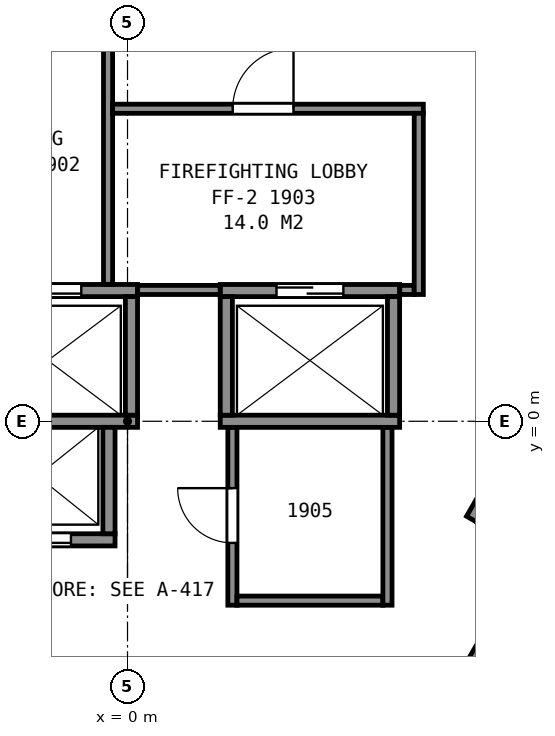
"""IFC4 building model, lengths in metres.
Left out: names, types, materials, properties, quantities, classifications, styles, units other than length and angle.
Written with IfcOpenShell. Run it as: python <this file> out.ifc"""

import sys

from ifc_helpers import new_model, si_unit, direction, frame, frame_2d, origin, place, context, subcontext, project, spatial, rectangle, extrude, element, fill, save


model = new_model("IFC4")
c1 = context("Model", 3, precision=1e-05, world=origin(), true_north=direction((0.0, 1.0)))
c2 = subcontext(c1, "Body", "Model", "MODEL_VIEW")
j1 = project(units=[si_unit("LENGTHUNIT", "METRE"), si_unit("PLANEANGLEUNIT", "RADIAN")], contexts=[c1])
p1 = place(None, origin())
s1 = spatial("IfcSite", under=j1, at=p1, CompositionType="ELEMENT")
p2 = place(p1, origin())
s2 = spatial("IfcBuilding", under=s1, at=p2, CompositionType="ELEMENT")
p3 = place(p2, frame((0.0, 0.0, 83.6)))
s3 = spatial("IfcBuildingStorey", under=s2, at=p3, CompositionType="ELEMENT", Elevation=83.6)
p4 = place(p3, frame((-2.755, -1.95, 0.0), z_axis=(0.0, 0.0, 1.0), x_axis=(1.0, 0.0, 0.0)))
e1 = element("IfcWall", 1, at=p4, inside=s3, PredefinedType="PARTITIONING", context=c2, shape_type="SweptSolid", body=[
    extrude(rectangle(XDim=2.55, YDim=0.2, at=frame_2d((1.275, 0.0))), origin(), (0.0, 0.0, 1.0), 3.6),
])
p5 = place(p4, frame((0.725, 0.0, 0.0)))
e2 = element("IfcOpeningElement", 2, at=p5, cuts=e1, PredefinedType="OPENING", context=c2, shape_type="SweptSolid", body=[
    extrude(rectangle(XDim=1.1, YDim=2.1, at=frame_2d((0.55, 1.05))), frame((0.0, 0.11, 0.0), z_axis=(0.0, -1.0, 0.0), x_axis=(1.0, 0.0, 0.0)), (0.0, 0.0, 1.0), 0.22),
])
p6 = place(p3, frame((-2.785, 0.0, 0.0), z_axis=(0.0, 0.0, 1.0), x_axis=(1.0, 0.0, 0.0)))
e3 = element("IfcWall", 3, at=p6, inside=s3, PredefinedType="PARTITIONING", context=c2, shape_type="SweptSolid", body=[
    extrude(rectangle(XDim=2.95, YDim=0.2, at=frame_2d((1.475, 0.0))), origin(), (0.0, 0.0, 1.0), 3.6),
])
p7 = place(p3, frame((1.525, 0.0, 0.0), z_axis=(0.0, 0.0, 1.0), x_axis=(1.0, 0.0, 0.0)))
e4 = element("IfcWall", 4, at=p7, inside=s3, PredefinedType="PARTITIONING", context=c2, shape_type="SweptSolid", body=[
    extrude(rectangle(XDim=2.95, YDim=0.2, at=frame_2d((1.475, 0.0))), origin(), (0.0, 0.0, 1.0), 3.6),
])
p8 = place(p3, frame((-2.785, 2.15, 0.0), z_axis=(0.0, 0.0, 1.0), x_axis=(1.0, 0.0, 0.0)))
e5 = element("IfcWall", 5, at=p8, inside=s3, PredefinedType="PARTITIONING", context=c2, shape_type="SweptSolid", body=[
    extrude(rectangle(XDim=2.95, YDim=0.2, at=frame_2d((1.475, 0.0))), origin(), (0.0, 0.0, 1.0), 3.6),
])
p9 = place(p8, frame((0.925, 0.0, 0.0)))
e6 = element("IfcOpeningElement", 6, at=p9, cuts=e5, PredefinedType="OPENING", context=c2, shape_type="SweptSolid", body=[
    extrude(rectangle(XDim=1.1, YDim=2.1, at=frame_2d((0.55, 1.05))), frame((0.0, 0.11, 0.0), z_axis=(0.0, -1.0, 0.0), x_axis=(1.0, 0.0, 0.0)), (0.0, 0.0, 1.0), 0.22),
])
p10 = place(p3, frame((1.525, 2.15, 0.0), z_axis=(0.0, 0.0, 1.0), x_axis=(1.0, 0.0, 0.0)))
e7 = element("IfcWall", 7, at=p10, inside=s3, PredefinedType="PARTITIONING", context=c2, shape_type="SweptSolid", body=[
    extrude(rectangle(XDim=2.95, YDim=0.2, at=frame_2d((1.475, 0.0))), origin(), (0.0, 0.0, 1.0), 3.6),
])
p11 = place(p10, frame((0.925, 0.0, 0.0)))
e8 = element("IfcOpeningElement", 8, at=p11, cuts=e7, PredefinedType="OPENING", context=c2, shape_type="SweptSolid", body=[
    extrude(rectangle(XDim=1.1, YDim=2.1, at=frame_2d((0.55, 1.05))), frame((0.0, 0.11, 0.0), z_axis=(0.0, -1.0, 0.0), x_axis=(1.0, 0.0, 0.0)), (0.0, 0.0, 1.0), 0.22),
])
p12 = place(p3, frame((5.527, -4.247, 0.0), z_axis=(0.0, 0.0, 1.0), x_axis=(0.499938297808, 0.866061024631, 0.0)))
e9 = element("IfcWall", 9, at=p12, inside=s3, PredefinedType="PARTITIONING", context=c2, shape_type="SweptSolid", body=[
    extrude(rectangle(XDim=2.35, YDim=0.2, at=frame_2d((1.175, 0.0))), origin(), (0.0, 0.0, 1.0), 3.6),
])
p13 = place(p12, frame((0.725, 0.0, 0.0)))
e10 = element("IfcOpeningElement", 10, at=p13, cuts=e9, PredefinedType="OPENING", context=c2, shape_type="SweptSolid", body=[
    extrude(rectangle(XDim=1.1, YDim=2.1, at=frame_2d((0.55, 1.05))), frame((0.0, 0.11, 0.0), z_axis=(0.0, -1.0, 0.0), x_axis=(1.0, 0.0, 0.0)), (0.0, 0.0, 1.0), 0.22),
])
p14 = place(p3, frame((5.663, -1.612, 0.0), z_axis=(0.0, 0.0, 1.0), x_axis=(0.49998122708, 0.866036242063, 0.0)))
e11 = element("IfcWall", 11, at=p14, inside=s3, PredefinedType="PARTITIONING", context=c2, shape_type="SweptSolid", body=[
    extrude(rectangle(XDim=4.9, YDim=0.2, at=frame_2d((2.45, 0.0))), origin(), (0.0, 0.0, 1.0), 3.6),
])
for number, where, z_axis, x_axis in (
    (12, (4.375, 0.1, 0.0), (0.0, 0.0, 1.0), (0.0, 1.0, 0.0)),
    (13, (1.625, 0.1, 0.0), (0.0, 0.0, 1.0), (0.0, 1.0, 0.0)),
    (14, (0.065, 0.1, 0.0), (0.0, 0.0, 1.0), (0.0, 1.0, 0.0)),
):
    element("IfcWall", number, at=place(p3, frame(where, z_axis=z_axis, x_axis=x_axis)), inside=s3, PredefinedType="PARTITIONING", context=c2, shape_type="SweptSolid", body=[
        extrude(rectangle(XDim=1.95, YDim=0.2, at=frame_2d((0.975, 0.0))), origin(), (0.0, 0.0, 1.0), 3.6),
    ])
p15 = place(p3, frame((-0.305, -1.85, 0.0), z_axis=(0.0, 0.0, 1.0), x_axis=(0.0, 1.0, 0.0)))
e15 = element("IfcWall", 15, at=p15, inside=s3, PredefinedType="PARTITIONING", context=c2, shape_type="SweptSolid", body=[
    extrude(rectangle(XDim=1.75, YDim=0.2, at=frame_2d((0.875, 0.0))), origin(), (0.0, 0.0, 1.0), 3.6),
])
p16 = place(p3, frame((-0.32, 2.252, 0.0), z_axis=(0.0, 0.0, 1.0), x_axis=(0.0, 1.0, 0.0)))
e16 = element("IfcWall", 16, at=p16, inside=s3, PredefinedType="PARTITIONING", context=c2, shape_type="SweptSolid", body=[
    extrude(rectangle(XDim=4.063, YDim=0.15, at=frame_2d((2.031, 0.0))), origin(), (0.0, 0.0, 1.0), 3.35),
])
p17 = place(p3, frame((-0.245, 5.14, 0.0), z_axis=(0.0, 0.0, 1.0), x_axis=(1.0, 0.0, 0.0)))
e17 = element("IfcWall", 17, at=p17, inside=s3, PredefinedType="PARTITIONING", context=c2, shape_type="SweptSolid", body=[
    extrude(rectangle(XDim=5.11, YDim=0.15, at=frame_2d((2.555, 0.0))), origin(), (0.0, 0.0, 1.0), 3.35),
])
p18 = place(p17, frame((1.975, 0.0, 0.0)))
e18 = element("IfcOpeningElement", 18, at=p18, cuts=e17, PredefinedType="OPENING", context=c2, shape_type="SweptSolid", body=[
    extrude(rectangle(XDim=1.0, YDim=2.1, at=frame_2d((0.5, 1.05))), frame((0.0, 0.085, 0.0), z_axis=(0.0, -1.0, 0.0), x_axis=(1.0, 0.0, 0.0)), (0.0, 0.0, 1.0), 0.17),
])
p19 = place(p3, frame((0.167, 2.16, 0.0), z_axis=(0.0, 0.0, 1.0), x_axis=(1.0, 0.0, 0.0)))
e19 = element("IfcWall", 19, at=p19, inside=s3, PredefinedType="PARTITIONING", context=c2, shape_type="SweptSolid", body=[
    extrude(rectangle(XDim=1.356, YDim=0.15, at=frame_2d((0.678, 0.0))), origin(), (0.0, 0.0, 1.0), 3.35),
])
p20 = place(p3, frame((1.725, -0.102, 0.0), z_axis=(0.0, 0.0, 1.0), x_axis=(0.0, -1.0, 0.0)))
e20 = element("IfcWall", 20, at=p20, inside=s3, PredefinedType="PARTITIONING", context=c2, shape_type="SweptSolid", body=[
    extrude(rectangle(XDim=2.923, YDim=0.15, at=frame_2d((1.461, 0.0))), origin(), (0.0, 0.0, 1.0), 3.35),
])
p21 = place(p20, frame((0.998, 0.0, 0.0)))
e21 = element("IfcOpeningElement", 21, at=p21, cuts=e20, PredefinedType="OPENING", context=c2, shape_type="SweptSolid", body=[
    extrude(rectangle(XDim=0.9, YDim=2.1, at=frame_2d((0.45, 1.05))), frame((0.0, 0.085, 0.0), z_axis=(0.0, -1.0, 0.0), x_axis=(1.0, 0.0, 0.0)), (0.0, 0.0, 1.0), 0.17),
])
p22 = place(p3, frame((1.8, -2.95, 0.0), z_axis=(0.0, 0.0, 1.0), x_axis=(1.0, 0.0, 0.0)))
e22 = element("IfcWall", 22, at=p22, inside=s3, PredefinedType="PARTITIONING", context=c2, shape_type="SweptSolid", body=[
    extrude(rectangle(XDim=2.4, YDim=0.15, at=frame_2d((1.2, 0.0))), origin(), (0.0, 0.0, 1.0), 3.35),
])
p23 = place(p3, frame((4.275, -3.025, 0.0), z_axis=(0.0, 0.0, 1.0), x_axis=(0.0, 1.0, 0.0)))
e23 = element("IfcWall", 23, at=p23, inside=s3, PredefinedType="PARTITIONING", context=c2, shape_type="SweptSolid", body=[
    extrude(rectangle(XDim=2.923, YDim=0.15, at=frame_2d((1.461, 0.0))), origin(), (0.0, 0.0, 1.0), 3.35),
])
p24 = place(p3, frame((4.477, 2.16, 0.0), z_axis=(0.0, 0.0, 1.0), x_axis=(1.0, 0.0, 0.0)))
e24 = element("IfcWall", 24, at=p24, inside=s3, PredefinedType="PARTITIONING", context=c2, shape_type="SweptSolid", body=[
    extrude(rectangle(XDim=0.238, YDim=0.15, at=frame_2d((0.119, 0.0))), origin(), (0.0, 0.0, 1.0), 3.35),
])
p25 = place(p3, frame((4.79, 2.085, 0.0), z_axis=(0.0, 0.0, 1.0), x_axis=(0.0, 1.0, 0.0)))
e25 = element("IfcWall", 25, at=p25, inside=s3, PredefinedType="PARTITIONING", context=c2, shape_type="SweptSolid", body=[
    extrude(rectangle(XDim=2.98, YDim=0.15, at=frame_2d((1.49, 0.0))), origin(), (0.0, 0.0, 1.0), 3.35),
])
p26 = place(p3, frame((19.456, 7.217, 0.0), z_axis=(0.0, 0.0, 1.0), x_axis=(-0.50002170027, -0.866012874765, 0.0)))
e26 = element("IfcWall", 26, at=p26, inside=s3, PredefinedType="PARTITIONING", context=c2, shape_type="SweptSolid", body=[
    extrude(rectangle(XDim=31.379, YDim=0.125, at=frame_2d((15.69, 0.0))), origin(), (0.0, 0.0, 1.0), 2.262),
])
p27 = place(p26, frame((26.843, 0.0, 0.0)))
e27 = element("IfcOpeningElement", 27, at=p27, cuts=e26, PredefinedType="OPENING", context=c2, shape_type="SweptSolid", body=[
    extrude(rectangle(XDim=1.0, YDim=2.1, at=frame_2d((0.5, 1.05))), frame((0.0, 0.073, 0.0), z_axis=(0.0, -1.0, 0.0), x_axis=(1.0, 0.0, 0.0)), (0.0, 0.0, 1.0), 0.145),
])
p28 = place(p26, frame((24.03, 0.0, 0.0)))
e28 = element("IfcOpeningElement", 28, at=p28, cuts=e26, PredefinedType="OPENING", context=c2, shape_type="SweptSolid", body=[
    extrude(rectangle(XDim=0.9, YDim=2.1, at=frame_2d((0.45, 1.05))), frame((0.0, 0.073, 0.0), z_axis=(0.0, -1.0, 0.0), x_axis=(1.0, 0.0, 0.0)), (0.0, 0.0, 1.0), 0.145),
])
p29 = place(p26, frame((17.159, 0.0, 0.0)))
e29 = element("IfcOpeningElement", 29, at=p29, cuts=e26, PredefinedType="OPENING", context=c2, shape_type="SweptSolid", body=[
    extrude(rectangle(XDim=0.9, YDim=2.1, at=frame_2d((0.45, 1.05))), frame((0.0, 0.073, 0.0), z_axis=(0.0, -1.0, 0.0), x_axis=(1.0, 0.0, 0.0)), (0.0, 0.0, 1.0), 0.145),
])
p30 = place(p26, frame((14.24, 0.0, 0.0)))
e30 = element("IfcOpeningElement", 30, at=p30, cuts=e26, PredefinedType="OPENING", context=c2, shape_type="SweptSolid", body=[
    extrude(rectangle(XDim=0.9, YDim=2.1, at=frame_2d((0.45, 1.05))), frame((0.0, 0.073, 0.0), z_axis=(0.0, -1.0, 0.0), x_axis=(1.0, 0.0, 0.0)), (0.0, 0.0, 1.0), 0.145),
])
p31 = place(p26, frame((6.997, 0.0, 0.0)))
e31 = element("IfcOpeningElement", 31, at=p31, cuts=e26, PredefinedType="OPENING", context=c2, shape_type="SweptSolid", body=[
    extrude(rectangle(XDim=0.9, YDim=2.1, at=frame_2d((0.45, 1.05))), frame((0.0, 0.073, 0.0), z_axis=(0.0, -1.0, 0.0), x_axis=(1.0, 0.0, 0.0)), (0.0, 0.0, 1.0), 0.145),
])
p32 = place(p26, frame((4.327, 0.0, 0.0)))
e32 = element("IfcOpeningElement", 32, at=p32, cuts=e26, PredefinedType="OPENING", context=c2, shape_type="SweptSolid", body=[
    extrude(rectangle(XDim=0.9, YDim=2.1, at=frame_2d((0.45, 1.05))), frame((0.0, 0.073, 0.0), z_axis=(0.0, -1.0, 0.0), x_axis=(1.0, 0.0, 0.0)), (0.0, 0.0, 1.0), 0.145),
])
p33 = place(p5, origin())
e33 = element("IfcDoor", 33, at=p33, inside=s3, OperationType="SLIDING_TO_RIGHT", PredefinedType="DOOR", context=c2, shape_type="SweptSolid", body=[
    extrude(rectangle(XDim=1.1, YDim=2.1, at=frame_2d((0.55, 1.05))), frame((0.0, 0.025, 0.0), z_axis=(0.0, -1.0, 0.0), x_axis=(1.0, 0.0, 0.0)), (0.0, 0.0, 1.0), 0.05),
])
fill(e2, e33)
p34 = place(p9, origin())
e34 = element("IfcDoor", 34, at=p34, inside=s3, OperationType="SLIDING_TO_LEFT", PredefinedType="DOOR", context=c2, shape_type="SweptSolid", body=[
    extrude(rectangle(XDim=1.1, YDim=2.1, at=frame_2d((0.55, 1.05))), frame((0.0, 0.025, 0.0), z_axis=(0.0, -1.0, 0.0), x_axis=(1.0, 0.0, 0.0)), (0.0, 0.0, 1.0), 0.05),
])
fill(e6, e34)
p35 = place(p11, origin())
e35 = element("IfcDoor", 35, at=p35, inside=s3, OperationType="SLIDING_TO_RIGHT", PredefinedType="DOOR", context=c2, shape_type="SweptSolid", body=[
    extrude(rectangle(XDim=1.1, YDim=2.1, at=frame_2d((0.55, 1.05))), frame((0.0, 0.025, 0.0), z_axis=(0.0, -1.0, 0.0), x_axis=(1.0, 0.0, 0.0)), (0.0, 0.0, 1.0), 0.05),
])
fill(e8, e35)
p36 = place(p18, origin())
e36 = element("IfcDoor", 36, at=p36, inside=s3, OperationType="SINGLE_SWING_RIGHT", PredefinedType="DOOR", context=c2, shape_type="SweptSolid", body=[
    extrude(rectangle(XDim=1.0, YDim=2.1, at=frame_2d((0.5, 1.05))), frame((0.0, 0.025, 0.0), z_axis=(0.0, -1.0, 0.0), x_axis=(1.0, 0.0, 0.0)), (0.0, 0.0, 1.0), 0.05),
])
fill(e18, e36)
p37 = place(p21, origin())
e37 = element("IfcDoor", 37, at=p37, inside=s3, OperationType="SINGLE_SWING_LEFT", PredefinedType="DOOR", context=c2, shape_type="SweptSolid", body=[
    extrude(rectangle(XDim=0.9, YDim=2.1, at=frame_2d((0.45, 1.05))), frame((0.0, 0.025, 0.0), z_axis=(0.0, -1.0, 0.0), x_axis=(1.0, 0.0, 0.0)), (0.0, 0.0, 1.0), 0.05),
])
fill(e21, e37)
save(model, sys.argv[1])
